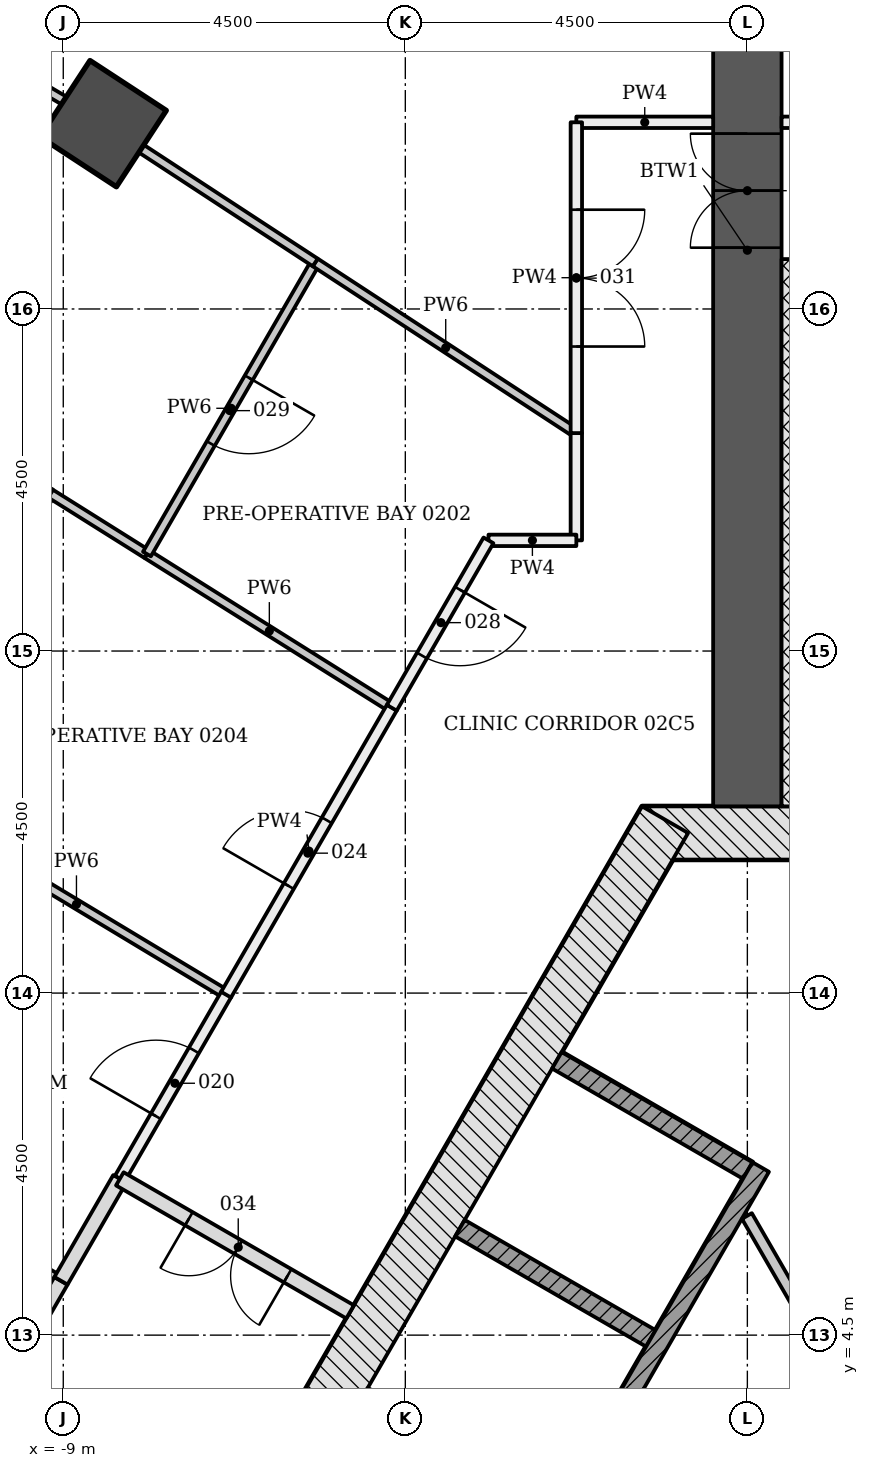
"""IFC4 building model, lengths in metres.
Left out: names, types, materials, properties, quantities, classifications, styles, units other than length and angle.
Written with IfcOpenShell. Run it as: python <this file> out.ifc"""

import sys

from ifc_helpers import new_model, si_unit, direction, frame, frame_2d, origin, origin_2d, place, context, subcontext, project, spatial, rectangle, extrude, element, fill, save


model = new_model("IFC4")
c1 = context("Model", 3, precision=1e-05, world=origin(), true_north=direction((0.0, 1.0)))
c2 = subcontext(c1, "Body", "Model", "MODEL_VIEW")
j1 = project(units=[si_unit("LENGTHUNIT", "METRE"), si_unit("PLANEANGLEUNIT", "RADIAN")], contexts=[c1])
p1 = place(None, origin())
s1 = spatial("IfcSite", under=j1, at=p1, CompositionType="ELEMENT")
p2 = place(p1, origin())
s2 = spatial("IfcBuilding", under=s1, at=p2, CompositionType="ELEMENT")
p3 = place(p2, frame((0.0, 0.0, 10.5)))
s3 = spatial("IfcBuildingStorey", under=s2, at=p3, CompositionType="ELEMENT", Elevation=10.5)
p4 = place(p3, frame((-8.475, 20.438, -0.25), z_axis=(0.0, 0.0, 1.0), x_axis=(-0.836867705394, 0.547405191489, 0.0)))
e1 = element("IfcColumn", 1, at=p4, inside=s3, PredefinedType="COLUMN", context=c2, shape_type="SweptSolid", body=[
    extrude(rectangle(XDim=1.2, YDim=1.2, at=origin_2d()), origin(), (0.0, 0.0, 1.0), 4.5),
])
p5 = place(p3, frame((1.386, 11.106, -0.25), z_axis=(0.0, 0.0, 1.0), x_axis=(-1.0, 0.0, 0.0)))
e2 = element("IfcWall", 2, at=p5, inside=s3, PredefinedType="SHEAR", context=c2, shape_type="SweptSolid", body=[
    extrude(rectangle(XDim=2.771, YDim=0.7, at=frame_2d((1.386, 0.0))), origin(), (0.0, 0.0, 1.0), 4.5),
])
p6 = place(p3, frame((-1.083, 11.281, -0.25), z_axis=(0.0, 0.0, 1.0), x_axis=(-0.500001446645, -0.866024568562, 0.0)))
e3 = element("IfcWall", 3, at=p6, inside=s3, PredefinedType="SHEAR", context=c2, shape_type="SweptSolid", body=[
    extrude(rectangle(XDim=18.458, YDim=0.7, at=frame_2d((9.229, 0.0))), origin(), (0.0, 0.0, 1.0), 4.5),
])
p7 = place(p6, frame((8.979, 0.0, 0.25)))
e4 = element("IfcOpeningElement", 4, at=p7, cuts=e3, PredefinedType="OPENING", context=c2, shape_type="SweptSolid", body=[
    extrude(rectangle(XDim=1.2, YDim=2.1, at=frame_2d((0.6, 1.05))), frame((0.0, 0.36, 0.0), z_axis=(0.0, -1.0, 0.0), x_axis=(1.0, 0.0, 0.0)), (0.0, 0.0, 1.0), 0.72),
])
p8 = place(p6, frame((11.029, 0.0, 0.25)))
e5 = element("IfcOpeningElement", 5, at=p8, cuts=e3, PredefinedType="OPENING", context=c2, shape_type="SweptSolid", body=[
    extrude(rectangle(XDim=1.2, YDim=2.1, at=frame_2d((0.6, 1.05))), frame((0.0, 0.36, 0.0), z_axis=(0.0, -1.0, 0.0), x_axis=(1.0, 0.0, 0.0)), (0.0, 0.0, 1.0), 0.72),
])
p9 = place(p3, frame((0.0, 11.456, -0.25), z_axis=(0.0, 0.0, 1.0), x_axis=(0.0, 1.0, 0.0)))
e6 = element("IfcWall", 6, at=p9, inside=s3, PredefinedType="SHEAR", context=c2, shape_type="SweptSolid", body=[
    extrude(rectangle(XDim=14.633, YDim=0.9, at=frame_2d((7.316, 0.0))), origin(), (0.0, 0.0, 1.0), 4.5),
])
p10 = place(p9, frame((7.35, 0.0, 0.25)))
e7 = element("IfcOpeningElement", 7, at=p10, cuts=e6, PredefinedType="OPENING", context=c2, shape_type="SweptSolid", body=[
    extrude(rectangle(XDim=1.5, YDim=2.1, at=frame_2d((0.75, 1.05))), frame((0.0, 0.46, 0.0), z_axis=(0.0, -1.0, 0.0), x_axis=(1.0, 0.0, 0.0)), (0.0, 0.0, 1.0), 0.92),
])
p11 = place(p3, frame((-2.506, 8.115, -0.25), z_axis=(0.0, 0.0, 1.0), x_axis=(0.865996321171, -0.50005036918, 0.0)))
e8 = element("IfcWall", 8, at=p11, inside=s3, PredefinedType="PARTITIONING", context=c2, shape_type="SweptSolid", body=[
    extrude(rectangle(XDim=2.9, YDim=0.25, at=frame_2d((1.45, 0.0))), origin(), (0.0, 0.0, 1.0), 4.5),
])
for number, where, z_axis, x_axis in (
    (9, (-3.781, 5.907, -0.25), (0.0, 0.0, 1.0), (0.866, -0.5, 0.0)),
    (10, (-5.056, 3.699, -0.25), (0.0, 0.0, 1.0), (0.866, -0.5, 0.0)),
):
    element("IfcWall", number, at=place(p3, frame(where, z_axis=z_axis, x_axis=x_axis)), inside=s3, PredefinedType="PARTITIONING", context=c2, shape_type="SweptSolid", body=[
        extrude(rectangle(XDim=2.9, YDim=0.25, at=frame_2d((1.45, 0.0))), origin(), (0.0, 0.0, 1.0), 4.5),
    ])
p12 = place(p3, frame((0.176, 6.711, 0.0), z_axis=(0.0, 0.0, 1.0), x_axis=(-0.500004227369, -0.866022963098, 0.0)))
e11 = element("IfcWall", 11, at=p12, inside=s3, PredefinedType="PARTITIONING", context=c2, shape_type="SweptSolid", body=[
    extrude(rectangle(XDim=11.8, YDim=0.25, at=frame_2d((5.9, 0.0))), origin(), (0.0, 0.0, 1.0), 4.25),
])
p13 = place(p3, frame((2.099, 2.42, 0.0), z_axis=(0.0, 0.0, 1.0), x_axis=(-0.499998449073, 0.866026299211, 0.0)))
e12 = element("IfcWall", 12, at=p13, inside=s3, PredefinedType="PARTITIONING", context=c2, shape_type="SweptSolid", body=[
    extrude(rectangle(XDim=4.211, YDim=0.15, at=frame_2d((2.106, 0.0))), origin(), (0.0, 0.0, 1.0), 4.25),
])
p14 = place(p3, frame((1.018, 11.456, -0.25), z_axis=(0.0, 0.0, 1.0), x_axis=(0.0, 1.0, 0.0)))
e13 = element("IfcWall", 13, at=p14, inside=s3, PredefinedType="SHEAR", context=c2, shape_type="SweptSolid", body=[
    extrude(rectangle(XDim=7.2, YDim=1.136, at=frame_2d((3.6, 0.0))), origin(), (0.0, 0.0, 1.0), 4.5),
])
p15 = place(p3, frame((-9.031, 5.213, 0.0), z_axis=(0.0, 0.0, 1.0), x_axis=(-0.500044734646, -0.865999574684, 0.0)))
e14 = element("IfcWall", 14, at=p15, inside=s3, PredefinedType="PARTITIONING", context=c2, shape_type="SweptSolid", body=[
    extrude(rectangle(XDim=4.35, YDim=0.2, at=frame_2d((2.175, 0.0))), origin(), (0.0, 0.0, 1.0), 3.638),
])
p16 = place(p3, frame((-8.256, 6.556, 0.0), z_axis=(0.0, 0.0, 1.0), x_axis=(-0.499904469662, -0.866080551226, 0.0)))
e15 = element("IfcWall", 15, at=p16, inside=s3, PredefinedType="PARTITIONING", context=c2, shape_type="SweptSolid", body=[
    extrude(rectangle(XDim=1.548, YDim=0.2, at=frame_2d((0.774, 0.0))), origin(), (0.0, 0.0, 1.0), 3.638),
])
p17 = place(p3, frame((-5.226, 4.806, 0.0), z_axis=(0.0, 0.0, 1.0), x_axis=(-0.865949687125, 0.500131122175, 0.0)))
e16 = element("IfcWall", 16, at=p17, inside=s3, PredefinedType="PARTITIONING", context=c2, shape_type="SweptSolid", body=[
    extrude(rectangle(XDim=3.499, YDim=0.2, at=frame_2d((1.75, 0.0))), origin(), (0.0, 0.0, 1.0), 4.25),
])
p18 = place(p17, frame((0.95, 0.0, 0.0)))
e17 = element("IfcOpeningElement", 17, at=p18, cuts=e16, PredefinedType="OPENING", context=c2, shape_type="SweptSolid", body=[
    extrude(rectangle(XDim=1.5, YDim=2.1, at=frame_2d((0.75, 1.05))), frame((0.0, 0.11, 0.0), z_axis=(0.0, -1.0, 0.0), x_axis=(1.0, 0.0, 0.0)), (0.0, 0.0, 1.0), 0.22),
])
p19 = place(p3, frame((7.136, 20.456, 0.0), z_axis=(0.0, 0.0, 1.0), x_axis=(-1.0, 0.0, 0.0)))
e18 = element("IfcWall", 18, at=p19, inside=s3, PredefinedType="PARTITIONING", context=c2, shape_type="SweptSolid", body=[
    extrude(rectangle(XDim=6.686, YDim=0.15, at=frame_2d((3.343, 0.0))), origin(), (0.0, 0.0, 1.0), 3.638),
])
p20 = place(p19, frame((2.45, 0.0, 0.0)))
e19 = element("IfcOpeningElement", 19, at=p20, cuts=e18, PredefinedType="OPENING", context=c2, shape_type="SweptSolid", body=[
    extrude(rectangle(XDim=1.8, YDim=2.1, at=frame_2d((0.9, 1.05))), frame((0.0, 0.085, 0.0), z_axis=(0.0, -1.0, 0.0), x_axis=(1.0, 0.0, 0.0)), (0.0, 0.0, 1.0), 0.17),
])
p21 = place(p3, frame((-9.032, 5.215, 0.0), z_axis=(0.0, 0.0, 1.0), x_axis=(-0.866130767322, 0.499817460578, 0.0)))
e20 = element("IfcWall", 20, at=p21, inside=s3, PredefinedType="PARTITIONING", context=c2, shape_type="SweptSolid", body=[
    extrude(rectangle(XDim=4.597, YDim=0.12, at=frame_2d((2.299, 0.0))), origin(), (0.0, 0.0, 1.0), 3.638),
])
p22 = place(p3, frame((-6.857, 8.983, 0.0), z_axis=(0.0, 0.0, 1.0), x_axis=(-0.856751730158, 0.515729069251, 0.0)))
e21 = element("IfcWall", 21, at=p22, inside=s3, PredefinedType="PARTITIONING", context=c2, shape_type="SweptSolid", body=[
    extrude(rectangle(XDim=4.598, YDim=0.12, at=frame_2d((2.299, 0.0))), origin(), (0.0, 0.0, 1.0), 3.638),
])
p23 = place(p3, frame((-8.256, 6.558, 0.0), z_axis=(0.0, 0.0, 1.0), x_axis=(0.500081734942, 0.86597820895, 0.0)))
e22 = element("IfcWall", 22, at=p23, inside=s3, PredefinedType="PARTITIONING", context=c2, shape_type="SweptSolid", body=[
    extrude(rectangle(XDim=2.804, YDim=0.15, at=frame_2d((1.402, 0.0))), origin(), (0.0, 0.0, 1.0), 3.638),
])
p24 = place(p23, frame((0.95, 0.0, 0.0)))
e23 = element("IfcOpeningElement", 23, at=p24, cuts=e22, PredefinedType="OPENING", context=c2, shape_type="SweptSolid", body=[
    extrude(rectangle(XDim=1.0, YDim=2.1, at=frame_2d((0.5, 1.05))), frame((0.0, 0.085, 0.0), z_axis=(0.0, -1.0, 0.0), x_axis=(1.0, 0.0, 0.0)), (0.0, 0.0, 1.0), 0.17),
])
p25 = place(p3, frame((-6.858, 8.979, 0.0), z_axis=(0.0, 0.0, 1.0), x_axis=(0.500105111742, 0.865964708986, 0.0)))
e24 = element("IfcWall", 24, at=p25, inside=s3, PredefinedType="PARTITIONING", context=c2, shape_type="SweptSolid", body=[
    extrude(rectangle(XDim=4.363, YDim=0.15, at=frame_2d((2.181, 0.0))), origin(), (0.0, 0.0, 1.0), 3.638),
])
p26 = place(p25, frame((1.65, 0.0, 0.0)))
e25 = element("IfcOpeningElement", 25, at=p26, cuts=e24, PredefinedType="OPENING", context=c2, shape_type="SweptSolid", body=[
    extrude(rectangle(XDim=1.0, YDim=2.1, at=frame_2d((0.5, 1.05))), frame((0.0, 0.085, 0.0), z_axis=(0.0, -1.0, 0.0), x_axis=(1.0, 0.0, 0.0)), (0.0, 0.0, 1.0), 0.17),
])
p27 = place(p3, frame((-9.17, 15.572, 0.0), z_axis=(0.0, 0.0, 1.0), x_axis=(-0.499902881486, -0.866081467924, 0.0)))
e26 = element("IfcWall", 26, at=p27, inside=s3, PredefinedType="PARTITIONING", context=c2, shape_type="SweptSolid", body=[
    extrude(rectangle(XDim=4.451, YDim=0.12, at=frame_2d((2.226, 0.0))), origin(), (0.0, 0.0, 1.0), 3.638),
])
p28 = place(p27, frame((1.75, 0.0, 0.0)))
e27 = element("IfcOpeningElement", 27, at=p28, cuts=e26, PredefinedType="OPENING", context=c2, shape_type="SweptSolid", body=[
    extrude(rectangle(XDim=1.0, YDim=2.1, at=frame_2d((0.5, 1.05))), frame((0.0, 0.07, 0.0), z_axis=(0.0, -1.0, 0.0), x_axis=(1.0, 0.0, 0.0)), (0.0, 0.0, 1.0), 0.14),
])
p29 = place(p3, frame((-4.68, 12.753, 0.0), z_axis=(0.0, 0.0, 1.0), x_axis=(-0.846844902979, 0.531839929206, 0.0)))
e28 = element("IfcWall", 28, at=p29, inside=s3, PredefinedType="PARTITIONING", context=c2, shape_type="SweptSolid", body=[
    extrude(rectangle(XDim=3.8, YDim=0.12, at=frame_2d((1.9, 0.0))), origin(), (0.0, 0.0, 1.0), 3.638),
])
p30 = place(p3, frame((-7.901, 14.776, 0.0), z_axis=(0.0, 0.0, 1.0), x_axis=(-0.847002237732, 0.531589323892, 0.0)))
e29 = element("IfcWall", 29, at=p30, inside=s3, PredefinedType="PARTITIONING", context=c2, shape_type="SweptSolid", body=[
    extrude(rectangle(XDim=1.503, YDim=0.12, at=frame_2d((0.751, 0.0))), origin(), (0.0, 0.0, 1.0), 3.638),
])
p31 = place(p3, frame((-2.25, 16.367, 0.0), z_axis=(0.0, 0.0, 1.0), x_axis=(0.0, -1.0, 0.0)))
e30 = element("IfcWall", 30, at=p31, inside=s3, PredefinedType="PARTITIONING", context=c2, shape_type="SweptSolid", body=[
    extrude(rectangle(XDim=1.411, YDim=0.15, at=frame_2d((0.706, 0.0))), origin(), (0.0, 0.0, 1.0), 3.638),
])
p32 = place(p3, frame((-2.25, 14.956, 0.0), z_axis=(0.0, 0.0, 1.0), x_axis=(-1.0, 0.0, 0.0)))
e31 = element("IfcWall", 31, at=p32, inside=s3, PredefinedType="PARTITIONING", context=c2, shape_type="SweptSolid", body=[
    extrude(rectangle(XDim=1.156, YDim=0.15, at=frame_2d((0.578, 0.0))), origin(), (0.0, 0.0, 1.0), 4.25),
])
p33 = place(p3, frame((-3.406, 14.956, 0.0), z_axis=(0.0, 0.0, 1.0), x_axis=(-0.499999364504, -0.866025770688, 0.0)))
e32 = element("IfcWall", 32, at=p33, inside=s3, PredefinedType="PARTITIONING", context=c2, shape_type="SweptSolid", body=[
    extrude(rectangle(XDim=2.544, YDim=0.15, at=frame_2d((1.272, 0.0))), origin(), (0.0, 0.0, 1.0), 3.638),
])
p34 = place(p33, frame((0.75, 0.0, 0.0)))
e33 = element("IfcOpeningElement", 33, at=p34, cuts=e32, PredefinedType="OPENING", context=c2, shape_type="SweptSolid", body=[
    extrude(rectangle(XDim=1.0, YDim=2.1, at=frame_2d((0.5, 1.05))), frame((0.0, 0.085, 0.0), z_axis=(0.0, -1.0, 0.0), x_axis=(1.0, 0.0, 0.0)), (0.0, 0.0, 1.0), 0.17),
])
p35 = place(p3, frame((-0.45, 20.456, 0.0), z_axis=(0.0, 0.0, 1.0), x_axis=(-1.0, 0.0, 0.0)))
e34 = element("IfcWall", 34, at=p35, inside=s3, PredefinedType="PARTITIONING", context=c2, shape_type="SweptSolid", body=[
    extrude(rectangle(XDim=1.8, YDim=0.15, at=frame_2d((0.9, 0.0))), origin(), (0.0, 0.0, 1.0), 3.638),
])
p36 = place(p3, frame((-2.25, 20.456, 0.0), z_axis=(0.0, 0.0, 1.0), x_axis=(0.0, -1.0, 0.0)))
e35 = element("IfcWall", 35, at=p36, inside=s3, PredefinedType="PARTITIONING", context=c2, shape_type="SweptSolid", body=[
    extrude(rectangle(XDim=4.089, YDim=0.15, at=frame_2d((2.044, 0.0))), origin(), (0.0, 0.0, 1.0), 3.638),
])
p37 = place(p36, frame((1.15, 0.0, 0.0)))
e36 = element("IfcOpeningElement", 36, at=p37, cuts=e35, PredefinedType="OPENING", context=c2, shape_type="SweptSolid", body=[
    extrude(rectangle(XDim=1.8, YDim=2.1, at=frame_2d((0.9, 1.05))), frame((0.0, 0.085, 0.0), z_axis=(0.0, -1.0, 0.0), x_axis=(1.0, 0.0, 0.0)), (0.0, 0.0, 1.0), 0.17),
])
p38 = place(p3, frame((-9.166, 15.571, 0.0), z_axis=(0.0, 0.0, 1.0), x_axis=(-0.84701751501, 0.531564981227, 0.0)))
e37 = element("IfcWall", 37, at=p38, inside=s3, PredefinedType="PARTITIONING", context=c2, shape_type="SweptSolid", body=[
    extrude(rectangle(XDim=2.045, YDim=0.12, at=frame_2d((1.022, 0.0))), origin(), (0.0, 0.0, 1.0), 3.638),
])
p39 = place(p3, frame((-5.684, 18.611, 0.0), z_axis=(0.0, 0.0, 1.0), x_axis=(-0.500099413844, -0.865967999567, 0.0)))
e38 = element("IfcWall", 38, at=p39, inside=s3, PredefinedType="PARTITIONING", context=c2, shape_type="SweptSolid", body=[
    extrude(rectangle(XDim=4.429, YDim=0.12, at=frame_2d((2.214, 0.0))), origin(), (0.0, 0.0, 1.0), 3.638),
])
p40 = place(p39, frame((1.75, 0.0, 0.0)))
e39 = element("IfcOpeningElement", 39, at=p40, cuts=e38, PredefinedType="OPENING", context=c2, shape_type="SweptSolid", body=[
    extrude(rectangle(XDim=1.0, YDim=2.1, at=frame_2d((0.5, 1.05))), frame((0.0, 0.07, 0.0), z_axis=(0.0, -1.0, 0.0), x_axis=(1.0, 0.0, 0.0)), (0.0, 0.0, 1.0), 0.14),
])
p41 = place(p3, frame((-2.252, 16.367, 0.0), z_axis=(0.0, 0.0, 1.0), x_axis=(-0.836925574982, 0.547316710819, 0.0)))
e40 = element("IfcWall", 40, at=p41, inside=s3, PredefinedType="PARTITIONING", context=c2, shape_type="SweptSolid", body=[
    extrude(rectangle(XDim=4.102, YDim=0.12, at=frame_2d((2.051, 0.0))), origin(), (0.0, 0.0, 1.0), 3.638),
])
p42 = place(p3, frame((-8.992, 20.743, 0.0), z_axis=(0.0, 0.0, 1.0), x_axis=(-0.861228913487, 0.508217235613, 0.0)))
e41 = element("IfcWall", 41, at=p42, inside=s3, PredefinedType="PARTITIONING", context=c2, shape_type="SweptSolid", body=[
    extrude(rectangle(XDim=2.94, YDim=0.12, at=frame_2d((1.47, 0.0))), origin(), (0.0, 0.0, 1.0), 3.633),
])
p43 = place(p3, frame((-5.685, 18.612, 0.0), z_axis=(0.0, 0.0, 1.0), x_axis=(-0.836813840242, 0.547487531163, 0.0)))
e42 = element("IfcWall", 42, at=p43, inside=s3, PredefinedType="PARTITIONING", context=c2, shape_type="SweptSolid", body=[
    extrude(rectangle(XDim=2.734, YDim=0.12, at=frame_2d((1.367, 0.0))), origin(), (0.0, 0.0, 1.0), 3.638),
])
p44 = place(p24, origin())
e43 = element("IfcDoor", 43, at=p44, inside=s3, OperationType="SINGLE_SWING_RIGHT", PredefinedType="DOOR", context=c2, shape_type="SweptSolid", body=[
    extrude(rectangle(XDim=1.0, YDim=2.1, at=frame_2d((0.5, 1.05))), frame((0.0, 0.025, 0.0), z_axis=(0.0, -1.0, 0.0), x_axis=(1.0, 0.0, 0.0)), (0.0, 0.0, 1.0), 0.05),
])
fill(e23, e43)
p45 = place(p26, origin())
e44 = element("IfcDoor", 44, at=p45, inside=s3, OperationType="SINGLE_SWING_LEFT", PredefinedType="DOOR", context=c2, shape_type="SweptSolid", body=[
    extrude(rectangle(XDim=1.0, YDim=2.1, at=frame_2d((0.5, 1.05))), frame((0.0, 0.025, 0.0), z_axis=(0.0, -1.0, 0.0), x_axis=(1.0, 0.0, 0.0)), (0.0, 0.0, 1.0), 0.05),
])
fill(e25, e44)
p46 = place(p34, origin())
e45 = element("IfcDoor", 45, at=p46, inside=s3, OperationType="SINGLE_SWING_RIGHT", PredefinedType="DOOR", context=c2, shape_type="SweptSolid", body=[
    extrude(rectangle(XDim=1.0, YDim=2.1, at=frame_2d((0.5, 1.05))), frame((0.0, 0.025, 0.0), z_axis=(0.0, -1.0, 0.0), x_axis=(1.0, 0.0, 0.0)), (0.0, 0.0, 1.0), 0.05),
])
fill(e33, e45)
p47 = place(p40, origin())
e46 = element("IfcDoor", 46, at=p47, inside=s3, OperationType="SINGLE_SWING_LEFT", PredefinedType="DOOR", context=c2, shape_type="SweptSolid", body=[
    extrude(rectangle(XDim=1.0, YDim=2.1, at=frame_2d((0.5, 1.05))), frame((0.0, 0.025, 0.0), z_axis=(0.0, -1.0, 0.0), x_axis=(1.0, 0.0, 0.0)), (0.0, 0.0, 1.0), 0.05),
])
fill(e39, e46)
p48 = place(p37, origin())
e47 = element("IfcDoor", 47, at=p48, inside=s3, OperationType="DOUBLE_DOOR_SINGLE_SWING", PredefinedType="DOOR", context=c2, shape_type="SweptSolid", body=[
    extrude(rectangle(XDim=1.8, YDim=2.1, at=frame_2d((0.9, 1.05))), frame((0.0, 0.025, 0.0), z_axis=(0.0, -1.0, 0.0), x_axis=(1.0, 0.0, 0.0)), (0.0, 0.0, 1.0), 0.05),
])
fill(e36, e47)
p49 = place(p18, origin())
e48 = element("IfcDoor", 48, at=p49, inside=s3, OperationType="DOUBLE_DOOR_SINGLE_SWING", PredefinedType="DOOR", context=c2, shape_type="SweptSolid", body=[
    extrude(rectangle(XDim=1.5, YDim=2.1, at=frame_2d((0.75, 1.05))), frame((0.0, 0.025, 0.0), z_axis=(0.0, -1.0, 0.0), x_axis=(1.0, 0.0, 0.0)), (0.0, 0.0, 1.0), 0.05),
])
fill(e17, e48)
p50 = place(p10, origin())
e49 = element("IfcDoor", 49, at=p50, inside=s3, OperationType="DOUBLE_DOOR_SINGLE_SWING", PredefinedType="DOOR", context=c2, shape_type="SweptSolid", body=[
    extrude(rectangle(XDim=1.5, YDim=2.1, at=frame_2d((0.75, 1.05))), frame((0.0, 0.025, 0.0), z_axis=(0.0, -1.0, 0.0), x_axis=(1.0, 0.0, 0.0)), (0.0, 0.0, 1.0), 0.05),
])
fill(e7, e49)
save(model, sys.argv[1])
